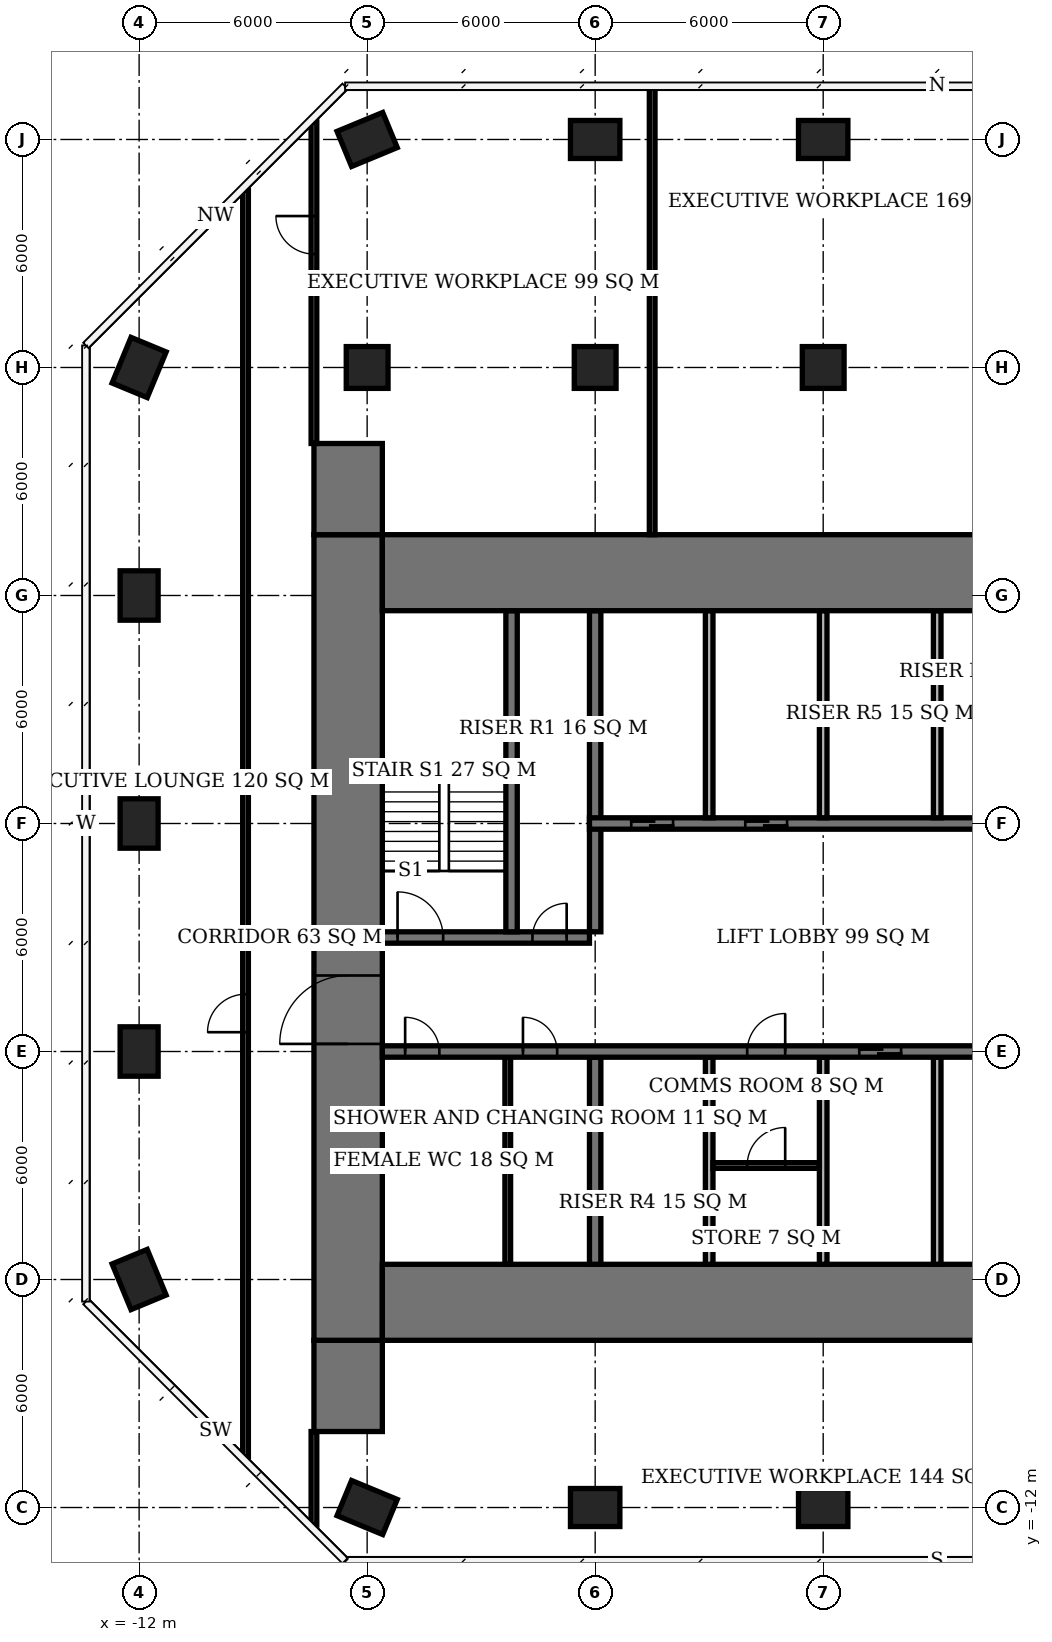
"""IFC4 building model, lengths in metres.
Left out: names, types, materials, properties, quantities, classifications, styles, units other than length and angle.
Written with IfcOpenShell. Run it as: python <this file> out.ifc"""

import sys

from ifc_helpers import new_model, si_unit, direction, frame, frame_2d, origin, origin_2d, place, context, subcontext, project, spatial, rectangle, extrude, element, fill, save


model = new_model("IFC4")
c1 = context("Model", 3, precision=1e-05, world=origin(), true_north=direction((0.0, 1.0)))
c2 = subcontext(c1, "Body", "Model", "MODEL_VIEW")
j1 = project(units=[si_unit("LENGTHUNIT", "METRE"), si_unit("PLANEANGLEUNIT", "RADIAN")], contexts=[c1])
p1 = place(None, origin())
s1 = spatial("IfcSite", under=j1, at=p1, CompositionType="ELEMENT")
p2 = place(p1, origin())
s2 = spatial("IfcBuilding", under=s1, at=p2, CompositionType="ELEMENT")
p3 = place(p2, frame((0.0, 0.0, 248.9)))
s3 = spatial("IfcBuildingStorey", under=s2, at=p3, CompositionType="ELEMENT", Elevation=248.9)
for number, where, z_axis, x_axis in (
    (1, (-12.0, -6.0, 0.0), (0.0, 0.0, 1.0), (-0.383, 0.924, 0.0)),
    (2, (-12.0, 0.0, 0.0), (0.0, 0.0, 1.0), (0.0, 1.0, 0.0)),
    (3, (-12.0, 6.0, 0.0), (0.0, 0.0, 1.0), (0.0, 1.0, 0.0)),
    (4, (-12.0, 12.0, 0.0), (0.0, 0.0, 1.0), (0.0, 1.0, 0.0)),
    (5, (-12.0, 18.0, 0.0), (0.0, 0.0, 1.0), (0.383, 0.924, 0.0)),
    (6, (-6.0, -12.0, 0.0), (0.0, 0.0, 1.0), (-0.924, 0.383, 0.0)),
):
    element("IfcColumn", number, at=place(p3, frame(where, z_axis=z_axis, x_axis=x_axis)), inside=s3, PredefinedType="COLUMN", context=c2, shape_type="SweptSolid", body=[
        extrude(rectangle(XDim=1.3, YDim=1.0, at=origin_2d()), origin(), (0.0, 0.0, 1.0), 3.9),
    ])
p4 = place(p3, frame((-6.0, 18.0, 0.0), z_axis=(0.0, 0.0, 1.0), x_axis=(1.0, 0.0, 0.0)))
e7 = element("IfcColumn", 7, at=p4, inside=s3, PredefinedType="COLUMN", context=c2, shape_type="SweptSolid", body=[
    extrude(rectangle(XDim=1.1, YDim=1.1, at=origin_2d()), origin(), (0.0, 0.0, 1.0), 3.9),
])
for number, where, z_axis, x_axis in (
    (8, (-6.0, 24.0, 0.0), (0.0, 0.0, 1.0), (0.924, 0.383, 0.0)),
    (9, (0.0, -12.0, 0.0), (0.0, 0.0, 1.0), (1.0, 0.0, 0.0)),
):
    element("IfcColumn", number, at=place(p3, frame(where, z_axis=z_axis, x_axis=x_axis)), inside=s3, PredefinedType="COLUMN", context=c2, shape_type="SweptSolid", body=[
        extrude(rectangle(XDim=1.3, YDim=1.0, at=origin_2d()), origin(), (0.0, 0.0, 1.0), 3.9),
    ])
p5 = place(p3, frame((0.0, 18.0, 0.0), z_axis=(0.0, 0.0, 1.0), x_axis=(1.0, 0.0, 0.0)))
e10 = element("IfcColumn", 10, at=p5, inside=s3, PredefinedType="COLUMN", context=c2, shape_type="SweptSolid", body=[
    extrude(rectangle(XDim=1.1, YDim=1.1, at=origin_2d()), origin(), (0.0, 0.0, 1.0), 3.9),
])
for number, where, z_axis, x_axis in (
    (11, (0.0, 24.0, 0.0), (0.0, 0.0, 1.0), (1.0, 0.0, 0.0)),
    (12, (6.0, -12.0, 0.0), (0.0, 0.0, 1.0), (1.0, 0.0, 0.0)),
):
    element("IfcColumn", number, at=place(p3, frame(where, z_axis=z_axis, x_axis=x_axis)), inside=s3, PredefinedType="COLUMN", context=c2, shape_type="SweptSolid", body=[
        extrude(rectangle(XDim=1.3, YDim=1.0, at=origin_2d()), origin(), (0.0, 0.0, 1.0), 3.9),
    ])
p6 = place(p3, frame((6.0, 18.0, 0.0), z_axis=(0.0, 0.0, 1.0), x_axis=(1.0, 0.0, 0.0)))
e13 = element("IfcColumn", 13, at=p6, inside=s3, PredefinedType="COLUMN", context=c2, shape_type="SweptSolid", body=[
    extrude(rectangle(XDim=1.1, YDim=1.1, at=origin_2d()), origin(), (0.0, 0.0, 1.0), 3.9),
])
p7 = place(p3, frame((6.0, 24.0, 0.0), z_axis=(0.0, 0.0, 1.0), x_axis=(1.0, 0.0, 0.0)))
e14 = element("IfcColumn", 14, at=p7, inside=s3, PredefinedType="COLUMN", context=c2, shape_type="SweptSolid", body=[
    extrude(rectangle(XDim=1.3, YDim=1.0, at=origin_2d()), origin(), (0.0, 0.0, 1.0), 3.9),
])
for number, where, z_axis, x_axis in (
    (15, (-5.6, -6.6, 0.0), (0.0, 0.0, 1.0), (1.0, 0.0, 0.0)),
    (16, (-5.6, 12.6, 0.0), (0.0, 0.0, 1.0), (1.0, 0.0, 0.0)),
):
    element("IfcWall", number, at=place(p3, frame(where, z_axis=z_axis, x_axis=x_axis)), inside=s3, PredefinedType="SHEAR", context=c2, shape_type="SweptSolid", body=[
        extrude(rectangle(XDim=23.2, YDim=2.0, at=frame_2d((11.6, 0.0))), origin(), (0.0, 0.0, 1.0), 3.9),
    ])
p8 = place(p3, frame((-6.5, -7.6, 0.0), z_axis=(0.0, 0.0, 1.0), x_axis=(0.0, 1.0, 0.0)))
e17 = element("IfcWall", 17, at=p8, inside=s3, PredefinedType="SHEAR", context=c2, shape_type="SweptSolid", body=[
    extrude(rectangle(XDim=21.2, YDim=1.8, at=frame_2d((10.6, 0.0))), origin(), (0.0, 0.0, 1.0), 3.9),
])
p9 = place(p8, frame((7.8, 0.0, 0.0)))
e18 = element("IfcOpeningElement", 18, at=p9, cuts=e17, PredefinedType="OPENING", context=c2, shape_type="SweptSolid", body=[
    extrude(rectangle(XDim=1.8, YDim=2.4, at=frame_2d((0.9, 1.2))), frame((0.0, 0.91, 0.0), z_axis=(0.0, -1.0, 0.0), x_axis=(1.0, 0.0, 0.0)), (0.0, 0.0, 1.0), 1.82),
])
for number, where, z_axis, x_axis in (
    (19, (-6.5, -10.0, 0.0), (0.0, 0.0, 1.0), (0.0, 1.0, 0.0)),
    (20, (-6.5, 13.6, 0.0), (0.0, 0.0, 1.0), (0.0, 1.0, 0.0)),
):
    element("IfcWall", number, at=place(p3, frame(where, z_axis=z_axis, x_axis=x_axis)), inside=s3, PredefinedType="SHEAR", context=c2, shape_type="SweptSolid", body=[
        extrude(rectangle(XDim=2.4, YDim=1.8, at=frame_2d((1.2, 0.0))), origin(), (0.0, 0.0, 1.0), 3.9),
    ])
p10 = place(p3, frame((-5.6, 0.0, 0.0), z_axis=(0.0, 0.0, 1.0), x_axis=(1.0, 0.0, 0.0)))
e21 = element("IfcWall", 21, at=p10, inside=s3, PredefinedType="SHEAR", context=c2, shape_type="SweptSolid", body=[
    extrude(rectangle(XDim=17.75, YDim=0.3, at=frame_2d((8.875, 0.0))), origin(), (0.0, 0.0, 1.0), 3.9),
])
p11 = place(p10, frame((0.6, 0.0, 0.0)))
e22 = element("IfcOpeningElement", 22, at=p11, cuts=e21, PredefinedType="OPENING", context=c2, shape_type="SweptSolid", body=[
    extrude(rectangle(XDim=0.9, YDim=2.1, at=frame_2d((0.45, 1.05))), frame((0.0, 0.16, 0.0), z_axis=(0.0, -1.0, 0.0), x_axis=(1.0, 0.0, 0.0)), (0.0, 0.0, 1.0), 0.32),
])
p12 = place(p10, frame((3.7, 0.0, 0.0)))
e23 = element("IfcOpeningElement", 23, at=p12, cuts=e21, PredefinedType="OPENING", context=c2, shape_type="SweptSolid", body=[
    extrude(rectangle(XDim=0.9, YDim=2.1, at=frame_2d((0.45, 1.05))), frame((0.0, 0.16, 0.0), z_axis=(0.0, -1.0, 0.0), x_axis=(1.0, 0.0, 0.0)), (0.0, 0.0, 1.0), 0.32),
])
p13 = place(p10, frame((9.6, 0.0, 0.0)))
e24 = element("IfcOpeningElement", 24, at=p13, cuts=e21, PredefinedType="OPENING", context=c2, shape_type="SweptSolid", body=[
    extrude(rectangle(XDim=1.0, YDim=2.1, at=frame_2d((0.5, 1.05))), frame((0.0, 0.16, 0.0), z_axis=(0.0, -1.0, 0.0), x_axis=(1.0, 0.0, 0.0)), (0.0, 0.0, 1.0), 0.32),
])
p14 = place(p10, frame((12.55, 0.0, 0.0)))
e25 = element("IfcOpeningElement", 25, at=p14, cuts=e21, PredefinedType="OPENING", context=c2, shape_type="SweptSolid", body=[
    extrude(rectangle(XDim=1.1, YDim=2.1, at=frame_2d((0.55, 1.05))), frame((0.0, 0.16, 0.0), z_axis=(0.0, -1.0, 0.0), x_axis=(1.0, 0.0, 0.0)), (0.0, 0.0, 1.0), 0.32),
])
p15 = place(p10, frame((15.55, 0.0, 0.0)))
e26 = element("IfcOpeningElement", 26, at=p15, cuts=e21, PredefinedType="OPENING", context=c2, shape_type="SweptSolid", body=[
    extrude(rectangle(XDim=1.1, YDim=2.1, at=frame_2d((0.55, 1.05))), frame((0.0, 0.16, 0.0), z_axis=(0.0, -1.0, 0.0), x_axis=(1.0, 0.0, 0.0)), (0.0, 0.0, 1.0), 0.32),
])
p16 = place(p3, frame((-5.6, 3.0, 0.0), z_axis=(0.0, 0.0, 1.0), x_axis=(1.0, 0.0, 0.0)))
e27 = element("IfcWall", 27, at=p16, inside=s3, PredefinedType="SHEAR", context=c2, shape_type="SweptSolid", body=[
    extrude(rectangle(XDim=5.45, YDim=0.3, at=frame_2d((2.725, 0.0))), origin(), (0.0, 0.0, 1.0), 3.9),
])
p17 = place(p16, frame((0.4, 0.0, 0.0)))
e28 = element("IfcOpeningElement", 28, at=p17, cuts=e27, PredefinedType="OPENING", context=c2, shape_type="SweptSolid", body=[
    extrude(rectangle(XDim=1.2, YDim=2.1, at=frame_2d((0.6, 1.05))), frame((0.0, 0.16, 0.0), z_axis=(0.0, -1.0, 0.0), x_axis=(1.0, 0.0, 0.0)), (0.0, 0.0, 1.0), 0.32),
])
p18 = place(p16, frame((3.95, 0.0, 0.0)))
e29 = element("IfcOpeningElement", 29, at=p18, cuts=e27, PredefinedType="OPENING", context=c2, shape_type="SweptSolid", body=[
    extrude(rectangle(XDim=0.9, YDim=2.1, at=frame_2d((0.45, 1.05))), frame((0.0, 0.16, 0.0), z_axis=(0.0, -1.0, 0.0), x_axis=(1.0, 0.0, 0.0)), (0.0, 0.0, 1.0), 0.32),
])
p19 = place(p3, frame((-0.15, 6.0, 0.0), z_axis=(0.0, 0.0, 1.0), x_axis=(1.0, 0.0, 0.0)))
e30 = element("IfcWall", 30, at=p19, inside=s3, PredefinedType="SHEAR", context=c2, shape_type="SweptSolid", body=[
    extrude(rectangle(XDim=17.75, YDim=0.3, at=frame_2d((8.875, 0.0))), origin(), (0.0, 0.0, 1.0), 3.9),
])
p20 = place(p19, frame((13.15, 0.0, 0.0)))
e31 = element("IfcOpeningElement", 31, at=p20, cuts=e30, PredefinedType="OPENING", context=c2, shape_type="SweptSolid", body=[
    extrude(rectangle(XDim=0.9, YDim=2.1, at=frame_2d((0.45, 1.05))), frame((0.0, 0.16, 0.0), z_axis=(0.0, -1.0, 0.0), x_axis=(1.0, 0.0, 0.0)), (0.0, 0.0, 1.0), 0.32),
])
p21 = place(p19, frame((16.25, 0.0, 0.0)))
e32 = element("IfcOpeningElement", 32, at=p21, cuts=e30, PredefinedType="OPENING", context=c2, shape_type="SweptSolid", body=[
    extrude(rectangle(XDim=1.0, YDim=2.1, at=frame_2d((0.5, 1.05))), frame((0.0, 0.16, 0.0), z_axis=(0.0, -1.0, 0.0), x_axis=(1.0, 0.0, 0.0)), (0.0, 0.0, 1.0), 0.32),
])
p22 = place(p19, frame((1.1, 0.0, 0.0)))
e33 = element("IfcOpeningElement", 33, at=p22, cuts=e30, PredefinedType="OPENING", context=c2, shape_type="SweptSolid", body=[
    extrude(rectangle(XDim=1.1, YDim=2.1, at=frame_2d((0.55, 1.05))), frame((0.0, 0.16, 0.0), z_axis=(0.0, -1.0, 0.0), x_axis=(1.0, 0.0, 0.0)), (0.0, 0.0, 1.0), 0.32),
])
p23 = place(p19, frame((4.1, 0.0, 0.0)))
e34 = element("IfcOpeningElement", 34, at=p23, cuts=e30, PredefinedType="OPENING", context=c2, shape_type="SweptSolid", body=[
    extrude(rectangle(XDim=1.1, YDim=2.1, at=frame_2d((0.55, 1.05))), frame((0.0, 0.16, 0.0), z_axis=(0.0, -1.0, 0.0), x_axis=(1.0, 0.0, 0.0)), (0.0, 0.0, 1.0), 0.32),
])
p24 = place(p3, frame((0.0, -5.6, 0.0), z_axis=(0.0, 0.0, 1.0), x_axis=(0.0, 1.0, 0.0)))
e35 = element("IfcWall", 35, at=p24, inside=s3, PredefinedType="SHEAR", context=c2, shape_type="SweptSolid", body=[
    extrude(rectangle(XDim=5.45, YDim=0.3, at=frame_2d((2.725, 0.0))), origin(), (0.0, 0.0, 1.0), 3.9),
])
for number, where, z_axis, x_axis in (
    (36, (0.0, 3.15, 0.0), (0.0, 0.0, 1.0), (0.0, 1.0, 0.0)),
    (37, (-2.2, 3.15, 0.0), (0.0, 0.0, 1.0), (0.0, 1.0, 0.0)),
):
    element("IfcWall", number, at=place(p3, frame(where, z_axis=z_axis, x_axis=x_axis)), inside=s3, PredefinedType="SHEAR", context=c2, shape_type="SweptSolid", body=[
        extrude(rectangle(XDim=8.45, YDim=0.3, at=frame_2d((4.225, 0.0))), origin(), (0.0, 0.0, 1.0), 3.9),
    ])
for number, where, z_axis, x_axis in (
    (38, (3.0, 6.15, 0.0), (0.0, 0.0, 1.0), (0.0, 1.0, 0.0)),
    (39, (6.0, 6.15, 0.0), (0.0, 0.0, 1.0), (0.0, 1.0, 0.0)),
    (40, (9.0, 6.15, 0.0), (0.0, 0.0, 1.0), (0.0, 1.0, 0.0)),
    (41, (3.0, -5.6, 0.0), (0.0, 0.0, 1.0), (0.0, 1.0, 0.0)),
    (42, (6.0, -5.6, 0.0), (0.0, 0.0, 1.0), (0.0, 1.0, 0.0)),
    (43, (9.0, -5.6, 0.0), (0.0, 0.0, 1.0), (0.0, 1.0, 0.0)),
):
    element("IfcWall", number, at=place(p3, frame(where, z_axis=z_axis, x_axis=x_axis)), inside=s3, PredefinedType="SOLIDWALL", context=c2, shape_type="SweptSolid", body=[
        extrude(rectangle(XDim=5.45, YDim=0.2, at=frame_2d((2.725, 0.0))), origin(), (0.0, 0.0, 1.0), 3.9),
    ])
p25 = place(p3, frame((-2.3, -5.6, 0.0), z_axis=(0.0, 0.0, 1.0), x_axis=(0.0, 1.0, 0.0)))
e44 = element("IfcWall", 44, at=p25, inside=s3, PredefinedType="PLUMBINGWALL", context=c2, shape_type="SweptSolid", body=[
    extrude(rectangle(XDim=5.45, YDim=0.15, at=frame_2d((2.725, 0.0))), origin(), (0.0, 0.0, 1.0), 3.65),
])
p26 = place(p3, frame((3.1, -3.0, 0.0), z_axis=(0.0, 0.0, 1.0), x_axis=(1.0, 0.0, 0.0)))
e45 = element("IfcWall", 45, at=p26, inside=s3, PredefinedType="PARTITIONING", context=c2, shape_type="SweptSolid", body=[
    extrude(rectangle(XDim=2.8, YDim=0.15, at=frame_2d((1.4, 0.0))), origin(), (0.0, 0.0, 1.0), 3.65),
])
p27 = place(p26, frame((0.9, 0.0, 0.0)))
e46 = element("IfcOpeningElement", 46, at=p27, cuts=e45, PredefinedType="OPENING", context=c2, shape_type="SweptSolid", body=[
    extrude(rectangle(XDim=1.0, YDim=2.1, at=frame_2d((0.5, 1.05))), frame((0.0, 0.085, 0.0), z_axis=(0.0, -1.0, 0.0), x_axis=(1.0, 0.0, 0.0)), (0.0, 0.0, 1.0), 0.17),
])
p28 = place(p3, frame((-9.2, -10.664, 0.0), z_axis=(0.0, 0.0, 1.0), x_axis=(0.0, 1.0, 0.0)))
e47 = element("IfcWall", 47, at=p28, inside=s3, PredefinedType="PARTITIONING", context=c2, shape_type="SweptSolid", body=[
    extrude(rectangle(XDim=33.328, YDim=0.15, at=frame_2d((16.664, 0.0))), origin(), (0.0, 0.0, 1.0), 3.65),
])
p29 = place(p28, frame((11.172, 0.0, 0.0)))
e48 = element("IfcOpeningElement", 48, at=p29, cuts=e47, PredefinedType="OPENING", context=c2, shape_type="SweptSolid", body=[
    extrude(rectangle(XDim=1.0, YDim=2.4, at=frame_2d((0.5, 1.2))), frame((0.0, 0.085, 0.0), z_axis=(0.0, -1.0, 0.0), x_axis=(1.0, 0.0, 0.0)), (0.0, 0.0, 1.0), 0.17),
])
p30 = place(p3, frame((-7.4, -12.464, 0.0), z_axis=(0.0, 0.0, 1.0), x_axis=(0.0, 1.0, 0.0)))
e49 = element("IfcWall", 49, at=p30, inside=s3, PredefinedType="PARTITIONING", context=c2, shape_type="SweptSolid", body=[
    extrude(rectangle(XDim=2.464, YDim=0.15, at=frame_2d((1.232, 0.0))), origin(), (0.0, 0.0, 1.0), 3.65),
])
p31 = place(p3, frame((-7.4, 16.0, 0.0), z_axis=(0.0, 0.0, 1.0), x_axis=(0.0, 1.0, 0.0)))
e50 = element("IfcWall", 50, at=p31, inside=s3, PredefinedType="PARTITIONING", context=c2, shape_type="SweptSolid", body=[
    extrude(rectangle(XDim=8.464, YDim=0.15, at=frame_2d((4.232, 0.0))), origin(), (0.0, 0.0, 1.0), 3.65),
])
p32 = place(p31, frame((4.985, 0.0, 0.0)))
e51 = element("IfcOpeningElement", 51, at=p32, cuts=e50, PredefinedType="OPENING", context=c2, shape_type="SweptSolid", body=[
    extrude(rectangle(XDim=1.0, YDim=2.4, at=frame_2d((0.5, 1.2))), frame((0.0, 0.085, 0.0), z_axis=(0.0, -1.0, 0.0), x_axis=(1.0, 0.0, 0.0)), (0.0, 0.0, 1.0), 0.17),
])
p33 = place(p3, frame((1.5, 13.6, 0.0), z_axis=(0.0, 0.0, 1.0), x_axis=(0.0, 1.0, 0.0)))
e52 = element("IfcWall", 52, at=p33, inside=s3, PredefinedType="PARTITIONING", context=c2, shape_type="SweptSolid", body=[
    extrude(rectangle(XDim=11.775, YDim=0.15, at=frame_2d((5.887, 0.0))), origin(), (0.0, 0.0, 1.0), 3.65),
])
p34 = place(p9, origin())
e53 = element("IfcDoor", 53, at=p34, inside=s3, OperationType="DOUBLE_DOOR_SINGLE_SWING", PredefinedType="DOOR", context=c2, shape_type="SweptSolid", body=[
    extrude(rectangle(XDim=1.8, YDim=2.4, at=frame_2d((0.9, 1.2))), frame((0.0, 0.025, 0.0), z_axis=(0.0, -1.0, 0.0), x_axis=(1.0, 0.0, 0.0)), (0.0, 0.0, 1.0), 0.05),
])
fill(e18, e53)
p35 = place(p17, origin())
e54 = element("IfcDoor", 54, at=p35, inside=s3, OperationType="SINGLE_SWING_LEFT", PredefinedType="DOOR", context=c2, shape_type="SweptSolid", body=[
    extrude(rectangle(XDim=1.2, YDim=2.1, at=frame_2d((0.6, 1.05))), frame((0.0, 0.025, 0.0), z_axis=(0.0, -1.0, 0.0), x_axis=(1.0, 0.0, 0.0)), (0.0, 0.0, 1.0), 0.05),
])
fill(e28, e54)
p36 = place(p18, origin())
e55 = element("IfcDoor", 55, at=p36, inside=s3, OperationType="SINGLE_SWING_RIGHT", PredefinedType="DOOR", context=c2, shape_type="SweptSolid", body=[
    extrude(rectangle(XDim=0.9, YDim=2.1, at=frame_2d((0.45, 1.05))), frame((0.0, 0.025, 0.0), z_axis=(0.0, -1.0, 0.0), x_axis=(1.0, 0.0, 0.0)), (0.0, 0.0, 1.0), 0.05),
])
fill(e29, e55)
p37 = place(p11, origin())
e56 = element("IfcDoor", 56, at=p37, inside=s3, OperationType="SINGLE_SWING_LEFT", PredefinedType="DOOR", context=c2, shape_type="SweptSolid", body=[
    extrude(rectangle(XDim=0.9, YDim=2.1, at=frame_2d((0.45, 1.05))), frame((0.0, 0.025, 0.0), z_axis=(0.0, -1.0, 0.0), x_axis=(1.0, 0.0, 0.0)), (0.0, 0.0, 1.0), 0.05),
])
fill(e22, e56)
p38 = place(p12, origin())
e57 = element("IfcDoor", 57, at=p38, inside=s3, OperationType="SINGLE_SWING_LEFT", PredefinedType="DOOR", context=c2, shape_type="SweptSolid", body=[
    extrude(rectangle(XDim=0.9, YDim=2.1, at=frame_2d((0.45, 1.05))), frame((0.0, 0.025, 0.0), z_axis=(0.0, -1.0, 0.0), x_axis=(1.0, 0.0, 0.0)), (0.0, 0.0, 1.0), 0.05),
])
fill(e23, e57)
p39 = place(p27, origin())
e58 = element("IfcDoor", 58, at=p39, inside=s3, OperationType="SINGLE_SWING_RIGHT", PredefinedType="DOOR", context=c2, shape_type="SweptSolid", body=[
    extrude(rectangle(XDim=1.0, YDim=2.1, at=frame_2d((0.5, 1.05))), frame((0.0, 0.025, 0.0), z_axis=(0.0, -1.0, 0.0), x_axis=(1.0, 0.0, 0.0)), (0.0, 0.0, 1.0), 0.05),
])
fill(e46, e58)
p40 = place(p13, origin())
e59 = element("IfcDoor", 59, at=p40, inside=s3, OperationType="SINGLE_SWING_RIGHT", PredefinedType="DOOR", context=c2, shape_type="SweptSolid", body=[
    extrude(rectangle(XDim=1.0, YDim=2.1, at=frame_2d((0.5, 1.05))), frame((0.0, 0.025, 0.0), z_axis=(0.0, -1.0, 0.0), x_axis=(1.0, 0.0, 0.0)), (0.0, 0.0, 1.0), 0.05),
])
fill(e24, e59)
p41 = place(p22, origin())
e60 = element("IfcDoor", 60, at=p41, inside=s3, OperationType="DOUBLE_DOOR_SLIDING", PredefinedType="USERDEFINED", context=c2, shape_type="SweptSolid", body=[
    extrude(rectangle(XDim=1.1, YDim=2.1, at=frame_2d((0.55, 1.05))), frame((0.0, 0.025, 0.0), z_axis=(0.0, -1.0, 0.0), x_axis=(1.0, 0.0, 0.0)), (0.0, 0.0, 1.0), 0.05),
])
fill(e33, e60)
p42 = place(p23, origin())
e61 = element("IfcDoor", 61, at=p42, inside=s3, OperationType="DOUBLE_DOOR_SLIDING", PredefinedType="USERDEFINED", context=c2, shape_type="SweptSolid", body=[
    extrude(rectangle(XDim=1.1, YDim=2.1, at=frame_2d((0.55, 1.05))), frame((0.0, 0.025, 0.0), z_axis=(0.0, -1.0, 0.0), x_axis=(1.0, 0.0, 0.0)), (0.0, 0.0, 1.0), 0.05),
])
fill(e34, e61)
p43 = place(p14, origin())
e62 = element("IfcDoor", 62, at=p43, inside=s3, OperationType="DOUBLE_DOOR_SLIDING", PredefinedType="USERDEFINED", context=c2, shape_type="SweptSolid", body=[
    extrude(rectangle(XDim=1.1, YDim=2.1, at=frame_2d((0.55, 1.05))), frame((0.0, 0.025, 0.0), z_axis=(0.0, -1.0, 0.0), x_axis=(1.0, 0.0, 0.0)), (0.0, 0.0, 1.0), 0.05),
])
fill(e25, e62)
p44 = place(p29, origin())
e63 = element("IfcDoor", 63, at=p44, inside=s3, OperationType="SINGLE_SWING_LEFT", PredefinedType="DOOR", context=c2, shape_type="SweptSolid", body=[
    extrude(rectangle(XDim=1.0, YDim=2.4, at=frame_2d((0.5, 1.2))), frame((0.0, 0.025, 0.0), z_axis=(0.0, -1.0, 0.0), x_axis=(1.0, 0.0, 0.0)), (0.0, 0.0, 1.0), 0.05),
])
fill(e48, e63)
p45 = place(p32, origin())
e64 = element("IfcDoor", 64, at=p45, inside=s3, OperationType="SINGLE_SWING_RIGHT", PredefinedType="DOOR", context=c2, shape_type="SweptSolid", body=[
    extrude(rectangle(XDim=1.0, YDim=2.4, at=frame_2d((0.5, 1.2))), frame((0.0, 0.025, 0.0), z_axis=(0.0, -1.0, 0.0), x_axis=(1.0, 0.0, 0.0)), (0.0, 0.0, 1.0), 0.05),
])
fill(e51, e64)
save(model, sys.argv[1])
